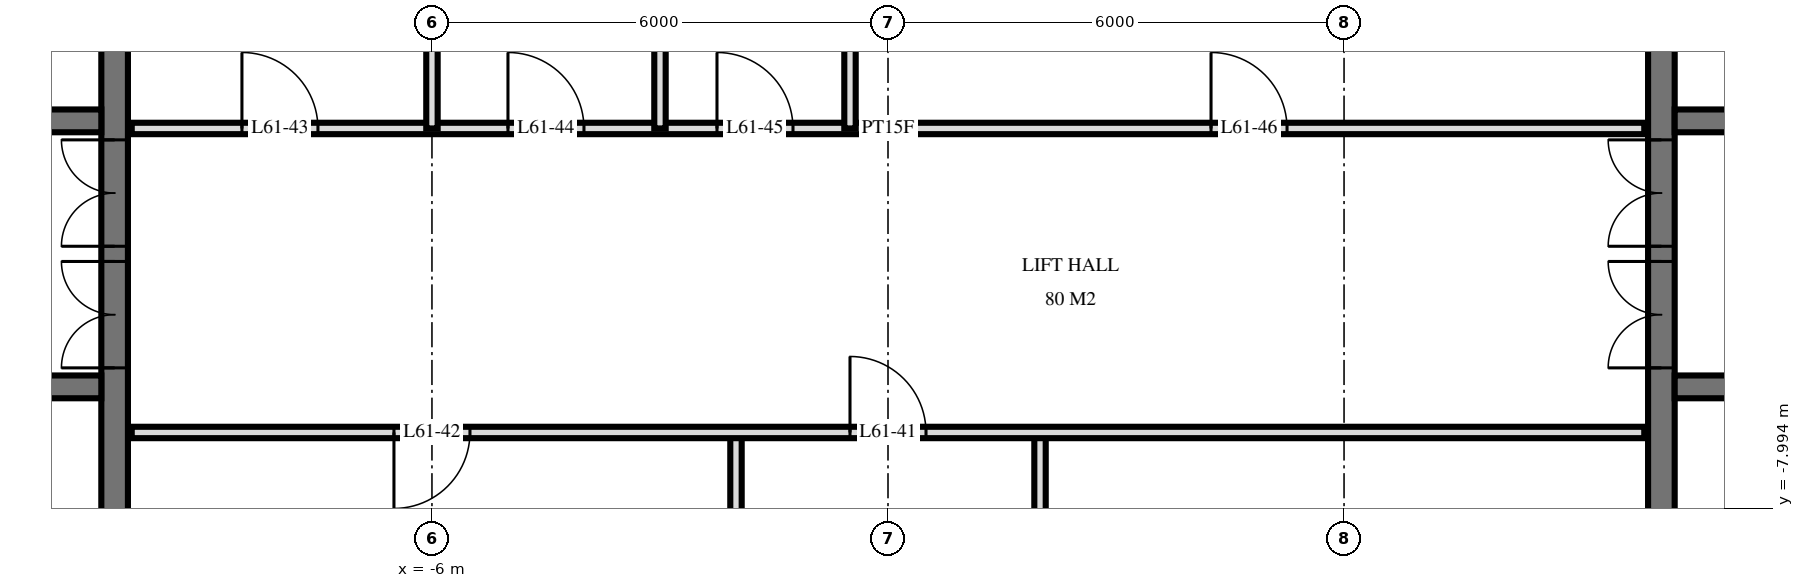
"""IFC4 building model, lengths in metres.
Left out: names, types, materials, properties, quantities, classifications, styles, units other than length and angle.
Written with IfcOpenShell. Run it as: python <this file> out.ifc"""

import sys

from ifc_helpers import new_model, si_unit, direction, frame, frame_2d, origin, place, context, subcontext, project, spatial, rectangle, extrude, element, fill, save


model = new_model("IFC4")
c1 = context("Model", 3, precision=1e-05, world=origin(), true_north=direction((0.0, 1.0)))
c2 = subcontext(c1, "Body", "Model", "MODEL_VIEW")
j1 = project(units=[si_unit("LENGTHUNIT", "METRE"), si_unit("PLANEANGLEUNIT", "RADIAN")], contexts=[c1])
p1 = place(None, origin())
s1 = spatial("IfcSite", under=j1, at=p1, CompositionType="ELEMENT")
p2 = place(p1, origin())
s2 = spatial("IfcBuilding", under=s1, at=p2, CompositionType="ELEMENT")
p3 = place(p2, frame((0.0, 0.0, 232.6)))
s3 = spatial("IfcBuildingStorey", under=s2, at=p3, CompositionType="ELEMENT", Elevation=232.6)
p4 = place(p3, frame((-10.175, -14.55, 0.0), z_axis=(0.0, 0.0, 1.0), x_axis=(0.0, 1.0, 0.0)))
e1 = element("IfcWall", 1, at=p4, inside=s3, PredefinedType="SHEAR", context=c2, shape_type="SweptSolid", body=[
    extrude(rectangle(XDim=14.1, YDim=0.35, at=frame_2d((7.05, 0.0))), origin(), (0.0, 0.0, 1.0), 3.5),
])
p5 = place(p4, frame((8.4, 0.0, 0.0)))
e2 = element("IfcOpeningElement", 2, at=p5, cuts=e1, PredefinedType="OPENING", context=c2, shape_type="SweptSolid", body=[
    extrude(rectangle(XDim=1.4, YDim=2.4, at=frame_2d((0.7, 1.2))), frame((0.0, 0.185, 0.0), z_axis=(0.0, -1.0, 0.0), x_axis=(1.0, 0.0, 0.0)), (0.0, 0.0, 1.0), 0.37),
])
p6 = place(p4, frame((10.0, 0.0, 0.0)))
e3 = element("IfcOpeningElement", 3, at=p6, cuts=e1, PredefinedType="OPENING", context=c2, shape_type="SweptSolid", body=[
    extrude(rectangle(XDim=1.4, YDim=2.4, at=frame_2d((0.7, 1.2))), frame((0.0, 0.185, 0.0), z_axis=(0.0, -1.0, 0.0), x_axis=(1.0, 0.0, 0.0)), (0.0, 0.0, 1.0), 0.37),
])
p7 = place(p4, frame((4.0, 0.0, 0.0)))
e4 = element("IfcOpeningElement", 4, at=p7, cuts=e1, PredefinedType="OPENING", context=c2, shape_type="SweptSolid", body=[
    extrude(rectangle(XDim=1.2, YDim=2.1, at=frame_2d((0.6, 1.05))), frame((0.0, 0.185, 0.0), z_axis=(0.0, -1.0, 0.0), x_axis=(1.0, 0.0, 0.0)), (0.0, 0.0, 1.0), 0.37),
])
p8 = place(p3, frame((-24.05, -2.9, 0.0), z_axis=(0.0, 0.0, 1.0), x_axis=(1.0, 0.0, 0.0)))
e5 = element("IfcWall", 5, at=p8, inside=s3, PredefinedType="SHEAR", context=c2, shape_type="SweptSolid", body=[
    extrude(rectangle(XDim=13.7, YDim=0.3, at=frame_2d((6.85, 0.0))), origin(), (0.0, 0.0, 1.0), 3.5),
])
p9 = place(p8, frame((0.55, 0.0, 0.0)))
e6 = element("IfcOpeningElement", 6, at=p9, cuts=e5, PredefinedType="OPENING", context=c2, shape_type="SweptSolid", body=[
    extrude(rectangle(XDim=1.1, YDim=2.1, at=frame_2d((0.55, 1.05))), frame((0.0, 0.16, 0.0), z_axis=(0.0, -1.0, 0.0), x_axis=(1.0, 0.0, 0.0)), (0.0, 0.0, 1.0), 0.32),
])
p10 = place(p8, frame((5.9, 0.0, 0.0)))
e7 = element("IfcOpeningElement", 7, at=p10, cuts=e5, PredefinedType="OPENING", context=c2, shape_type="SweptSolid", body=[
    extrude(rectangle(XDim=0.9, YDim=2.1, at=frame_2d((0.45, 1.05))), frame((0.0, 0.16, 0.0), z_axis=(0.0, -1.0, 0.0), x_axis=(1.0, 0.0, 0.0)), (0.0, 0.0, 1.0), 0.32),
])
p11 = place(p8, frame((11.85, 0.0, 0.0)))
e8 = element("IfcOpeningElement", 8, at=p11, cuts=e5, PredefinedType="OPENING", context=c2, shape_type="SweptSolid", body=[
    extrude(rectangle(XDim=1.0, YDim=2.1, at=frame_2d((0.5, 1.05))), frame((0.0, 0.16, 0.0), z_axis=(0.0, -1.0, 0.0), x_axis=(1.0, 0.0, 0.0)), (0.0, 0.0, 1.0), 0.32),
])
p12 = place(p8, frame((8.85, 0.0, 0.0)))
e9 = element("IfcOpeningElement", 9, at=p12, cuts=e5, PredefinedType="OPENING", context=c2, shape_type="SweptSolid", body=[
    extrude(rectangle(XDim=1.0, YDim=2.1, at=frame_2d((0.5, 1.05))), frame((0.0, 0.16, 0.0), z_axis=(0.0, -1.0, 0.0), x_axis=(1.0, 0.0, 0.0)), (0.0, 0.0, 1.0), 0.32),
])
p13 = place(p8, frame((3.0, 0.0, 0.0)))
e10 = element("IfcOpeningElement", 10, at=p13, cuts=e5, PredefinedType="OPENING", context=c2, shape_type="SweptSolid", body=[
    extrude(rectangle(XDim=1.0, YDim=2.1, at=frame_2d((0.5, 1.05))), frame((0.0, 0.16, 0.0), z_axis=(0.0, -1.0, 0.0), x_axis=(1.0, 0.0, 0.0)), (0.0, 0.0, 1.0), 0.32),
])
p14 = place(p3, frame((-24.05, -6.4, 0.0), z_axis=(0.0, 0.0, 1.0), x_axis=(1.0, 0.0, 0.0)))
e11 = element("IfcWall", 11, at=p14, inside=s3, PredefinedType="SHEAR", context=c2, shape_type="SweptSolid", body=[
    extrude(rectangle(XDim=13.7, YDim=0.3, at=frame_2d((6.85, 0.0))), origin(), (0.0, 0.0, 1.0), 3.5),
])
p15 = place(p14, frame((0.55, 0.0, 0.0)))
e12 = element("IfcOpeningElement", 12, at=p15, cuts=e11, PredefinedType="OPENING", context=c2, shape_type="SweptSolid", body=[
    extrude(rectangle(XDim=1.1, YDim=2.1, at=frame_2d((0.55, 1.05))), frame((0.0, 0.16, 0.0), z_axis=(0.0, -1.0, 0.0), x_axis=(1.0, 0.0, 0.0)), (0.0, 0.0, 1.0), 0.32),
])
p16 = place(p14, frame((5.8, 0.0, 0.0)))
e13 = element("IfcOpeningElement", 13, at=p16, cuts=e11, PredefinedType="OPENING", context=c2, shape_type="SweptSolid", body=[
    extrude(rectangle(XDim=1.1, YDim=2.1, at=frame_2d((0.55, 1.05))), frame((0.0, 0.16, 0.0), z_axis=(0.0, -1.0, 0.0), x_axis=(1.0, 0.0, 0.0)), (0.0, 0.0, 1.0), 0.32),
])
p17 = place(p3, frame((10.175, -14.55, 0.0), z_axis=(0.0, 0.0, 1.0), x_axis=(0.0, 1.0, 0.0)))
e14 = element("IfcWall", 14, at=p17, inside=s3, PredefinedType="SHEAR", context=c2, shape_type="SweptSolid", body=[
    extrude(rectangle(XDim=14.1, YDim=0.35, at=frame_2d((7.05, 0.0))), origin(), (0.0, 0.0, 1.0), 3.5),
])
p18 = place(p17, frame((8.4, 0.0, 0.0)))
e15 = element("IfcOpeningElement", 15, at=p18, cuts=e14, PredefinedType="OPENING", context=c2, shape_type="SweptSolid", body=[
    extrude(rectangle(XDim=1.4, YDim=2.4, at=frame_2d((0.7, 1.2))), frame((0.0, 0.185, 0.0), z_axis=(0.0, -1.0, 0.0), x_axis=(1.0, 0.0, 0.0)), (0.0, 0.0, 1.0), 0.37),
])
p19 = place(p17, frame((10.0, 0.0, 0.0)))
e16 = element("IfcOpeningElement", 16, at=p19, cuts=e14, PredefinedType="OPENING", context=c2, shape_type="SweptSolid", body=[
    extrude(rectangle(XDim=1.4, YDim=2.4, at=frame_2d((0.7, 1.2))), frame((0.0, 0.185, 0.0), z_axis=(0.0, -1.0, 0.0), x_axis=(1.0, 0.0, 0.0)), (0.0, 0.0, 1.0), 0.37),
])
p20 = place(p17, frame((4.0, 0.0, 0.0)))
e17 = element("IfcOpeningElement", 17, at=p20, cuts=e14, PredefinedType="OPENING", context=c2, shape_type="SweptSolid", body=[
    extrude(rectangle(XDim=1.2, YDim=2.1, at=frame_2d((0.6, 1.05))), frame((0.0, 0.185, 0.0), z_axis=(0.0, -1.0, 0.0), x_axis=(1.0, 0.0, 0.0)), (0.0, 0.0, 1.0), 0.37),
])
p21 = place(p3, frame((10.35, -2.9, 0.0), z_axis=(0.0, 0.0, 1.0), x_axis=(1.0, 0.0, 0.0)))
e18 = element("IfcWall", 18, at=p21, inside=s3, PredefinedType="SHEAR", context=c2, shape_type="SweptSolid", body=[
    extrude(rectangle(XDim=13.7, YDim=0.3, at=frame_2d((6.85, 0.0))), origin(), (0.0, 0.0, 1.0), 3.5),
])
p22 = place(p21, frame((12.05, 0.0, 0.0)))
e19 = element("IfcOpeningElement", 19, at=p22, cuts=e18, PredefinedType="OPENING", context=c2, shape_type="SweptSolid", body=[
    extrude(rectangle(XDim=1.1, YDim=2.1, at=frame_2d((0.55, 1.05))), frame((0.0, 0.16, 0.0), z_axis=(0.0, -1.0, 0.0), x_axis=(1.0, 0.0, 0.0)), (0.0, 0.0, 1.0), 0.32),
])
p23 = place(p21, frame((6.9, 0.0, 0.0)))
e20 = element("IfcOpeningElement", 20, at=p23, cuts=e18, PredefinedType="OPENING", context=c2, shape_type="SweptSolid", body=[
    extrude(rectangle(XDim=0.9, YDim=2.1, at=frame_2d((0.45, 1.05))), frame((0.0, 0.16, 0.0), z_axis=(0.0, -1.0, 0.0), x_axis=(1.0, 0.0, 0.0)), (0.0, 0.0, 1.0), 0.32),
])
p24 = place(p21, frame((0.85, 0.0, 0.0)))
e21 = element("IfcOpeningElement", 21, at=p24, cuts=e18, PredefinedType="OPENING", context=c2, shape_type="SweptSolid", body=[
    extrude(rectangle(XDim=1.0, YDim=2.1, at=frame_2d((0.5, 1.05))), frame((0.0, 0.16, 0.0), z_axis=(0.0, -1.0, 0.0), x_axis=(1.0, 0.0, 0.0)), (0.0, 0.0, 1.0), 0.32),
])
p25 = place(p21, frame((3.85, 0.0, 0.0)))
e22 = element("IfcOpeningElement", 22, at=p25, cuts=e18, PredefinedType="OPENING", context=c2, shape_type="SweptSolid", body=[
    extrude(rectangle(XDim=1.0, YDim=2.1, at=frame_2d((0.5, 1.05))), frame((0.0, 0.16, 0.0), z_axis=(0.0, -1.0, 0.0), x_axis=(1.0, 0.0, 0.0)), (0.0, 0.0, 1.0), 0.32),
])
p26 = place(p21, frame((9.7, 0.0, 0.0)))
e23 = element("IfcOpeningElement", 23, at=p26, cuts=e18, PredefinedType="OPENING", context=c2, shape_type="SweptSolid", body=[
    extrude(rectangle(XDim=1.0, YDim=2.1, at=frame_2d((0.5, 1.05))), frame((0.0, 0.16, 0.0), z_axis=(0.0, -1.0, 0.0), x_axis=(1.0, 0.0, 0.0)), (0.0, 0.0, 1.0), 0.32),
])
p27 = place(p3, frame((10.35, -6.4, 0.0), z_axis=(0.0, 0.0, 1.0), x_axis=(1.0, 0.0, 0.0)))
e24 = element("IfcWall", 24, at=p27, inside=s3, PredefinedType="SHEAR", context=c2, shape_type="SweptSolid", body=[
    extrude(rectangle(XDim=13.7, YDim=0.3, at=frame_2d((6.85, 0.0))), origin(), (0.0, 0.0, 1.0), 3.5),
])
p28 = place(p27, frame((12.05, 0.0, 0.0)))
e25 = element("IfcOpeningElement", 25, at=p28, cuts=e24, PredefinedType="OPENING", context=c2, shape_type="SweptSolid", body=[
    extrude(rectangle(XDim=1.1, YDim=2.1, at=frame_2d((0.55, 1.05))), frame((0.0, 0.16, 0.0), z_axis=(0.0, -1.0, 0.0), x_axis=(1.0, 0.0, 0.0)), (0.0, 0.0, 1.0), 0.32),
])
p29 = place(p27, frame((6.8, 0.0, 0.0)))
e26 = element("IfcOpeningElement", 26, at=p29, cuts=e24, PredefinedType="OPENING", context=c2, shape_type="SweptSolid", body=[
    extrude(rectangle(XDim=1.1, YDim=2.1, at=frame_2d((0.55, 1.05))), frame((0.0, 0.16, 0.0), z_axis=(0.0, -1.0, 0.0), x_axis=(1.0, 0.0, 0.0)), (0.0, 0.0, 1.0), 0.32),
])
p30 = place(p3, frame((2.0, -11.0, 0.0), z_axis=(0.0, 0.0, 1.0), x_axis=(0.0, 1.0, 0.0)))
e27 = element("IfcWall", 27, at=p30, inside=s3, PredefinedType="PARTITIONING", context=c2, shape_type="SweptSolid", body=[
    extrude(rectangle(XDim=4.0, YDim=0.15, at=frame_2d((2.0, 0.0))), origin(), (0.0, 0.0, 1.0), 3.22),
])
p31 = place(p3, frame((-0.5, -3.0, 0.0), z_axis=(0.0, 0.0, 1.0), x_axis=(0.0, 1.0, 0.0)))
e28 = element("IfcWall", 28, at=p31, inside=s3, PredefinedType="PLUMBINGWALL", context=c2, shape_type="SweptSolid", body=[
    extrude(rectangle(XDim=4.02, YDim=0.15, at=frame_2d((2.01, 0.0))), origin(), (0.0, 0.0, 1.0), 3.22),
])
p32 = place(p3, frame((-2.0, -11.0, 0.0), z_axis=(0.0, 0.0, 1.0), x_axis=(0.0, 1.0, 0.0)))
e29 = element("IfcWall", 29, at=p32, inside=s3, PredefinedType="PARTITIONING", context=c2, shape_type="SweptSolid", body=[
    extrude(rectangle(XDim=4.0, YDim=0.15, at=frame_2d((2.0, 0.0))), origin(), (0.0, 0.0, 1.0), 3.22),
])
for number, where, z_axis, x_axis in (
    (30, (-3.0, -3.0, 0.0), (0.0, 0.0, 1.0), (0.0, 1.0, 0.0)),
    (31, (-6.0, -3.0, 0.0), (0.0, 0.0, 1.0), (0.0, 1.0, 0.0)),
):
    element("IfcWall", number, at=place(p3, frame(where, z_axis=z_axis, x_axis=x_axis)), inside=s3, PredefinedType="PLUMBINGWALL", context=c2, shape_type="SweptSolid", body=[
        extrude(rectangle(XDim=4.02, YDim=0.15, at=frame_2d((2.01, 0.0))), origin(), (0.0, 0.0, 1.0), 3.22),
    ])
p33 = place(p3, frame((-9.95, -7.0, 0.0), z_axis=(0.0, 0.0, 1.0), x_axis=(1.0, 0.0, 0.0)))
e32 = element("IfcWall", 32, at=p33, inside=s3, PredefinedType="PARTITIONING", context=c2, shape_type="SweptSolid", body=[
    extrude(rectangle(XDim=19.9, YDim=0.15, at=frame_2d((9.95, 0.0))), origin(), (0.0, 0.0, 1.0), 3.22),
])
p34 = place(p33, frame((9.45, 0.0, 0.0)))
e33 = element("IfcOpeningElement", 33, at=p34, cuts=e32, PredefinedType="OPENING", context=c2, shape_type="SweptSolid", body=[
    extrude(rectangle(XDim=1.0, YDim=2.1, at=frame_2d((0.5, 1.05))), frame((0.0, 0.085, 0.0), z_axis=(0.0, -1.0, 0.0), x_axis=(1.0, 0.0, 0.0)), (0.0, 0.0, 1.0), 0.17),
])
p35 = place(p33, frame((3.45, 0.0, 0.0)))
e34 = element("IfcOpeningElement", 34, at=p35, cuts=e32, PredefinedType="OPENING", context=c2, shape_type="SweptSolid", body=[
    extrude(rectangle(XDim=1.0, YDim=2.1, at=frame_2d((0.5, 1.05))), frame((0.0, 0.085, 0.0), z_axis=(0.0, -1.0, 0.0), x_axis=(1.0, 0.0, 0.0)), (0.0, 0.0, 1.0), 0.17),
])
p36 = place(p3, frame((-9.95, -3.0, 0.0), z_axis=(0.0, 0.0, 1.0), x_axis=(1.0, 0.0, 0.0)))
e35 = element("IfcWall", 35, at=p36, inside=s3, PredefinedType="PARTITIONING", context=c2, shape_type="SweptSolid", body=[
    extrude(rectangle(XDim=19.9, YDim=0.15, at=frame_2d((9.95, 0.0))), origin(), (0.0, 0.0, 1.0), 3.22),
])
p37 = place(p36, frame((1.45, 0.0, 0.0)))
e36 = element("IfcOpeningElement", 36, at=p37, cuts=e35, PredefinedType="OPENING", context=c2, shape_type="SweptSolid", body=[
    extrude(rectangle(XDim=1.0, YDim=2.1, at=frame_2d((0.5, 1.05))), frame((0.0, 0.085, 0.0), z_axis=(0.0, -1.0, 0.0), x_axis=(1.0, 0.0, 0.0)), (0.0, 0.0, 1.0), 0.17),
])
p38 = place(p36, frame((4.95, 0.0, 0.0)))
e37 = element("IfcOpeningElement", 37, at=p38, cuts=e35, PredefinedType="OPENING", context=c2, shape_type="SweptSolid", body=[
    extrude(rectangle(XDim=1.0, YDim=2.1, at=frame_2d((0.5, 1.05))), frame((0.0, 0.085, 0.0), z_axis=(0.0, -1.0, 0.0), x_axis=(1.0, 0.0, 0.0)), (0.0, 0.0, 1.0), 0.17),
])
p39 = place(p36, frame((7.7, 0.0, 0.0)))
e38 = element("IfcOpeningElement", 38, at=p39, cuts=e35, PredefinedType="OPENING", context=c2, shape_type="SweptSolid", body=[
    extrude(rectangle(XDim=1.0, YDim=2.1, at=frame_2d((0.5, 1.05))), frame((0.0, 0.085, 0.0), z_axis=(0.0, -1.0, 0.0), x_axis=(1.0, 0.0, 0.0)), (0.0, 0.0, 1.0), 0.17),
])
p40 = place(p36, frame((14.2, 0.0, 0.0)))
e39 = element("IfcOpeningElement", 39, at=p40, cuts=e35, PredefinedType="OPENING", context=c2, shape_type="SweptSolid", body=[
    extrude(rectangle(XDim=1.0, YDim=2.1, at=frame_2d((0.5, 1.05))), frame((0.0, 0.085, 0.0), z_axis=(0.0, -1.0, 0.0), x_axis=(1.0, 0.0, 0.0)), (0.0, 0.0, 1.0), 0.17),
])
p41 = place(p5, origin())
e40 = element("IfcDoor", 40, at=p41, inside=s3, OperationType="DOUBLE_DOOR_SINGLE_SWING", PredefinedType="DOOR", context=c2, shape_type="SweptSolid", body=[
    extrude(rectangle(XDim=1.4, YDim=2.4, at=frame_2d((0.7, 1.2))), frame((0.0, 0.025, 0.0), z_axis=(0.0, -1.0, 0.0), x_axis=(1.0, 0.0, 0.0)), (0.0, 0.0, 1.0), 0.05),
])
fill(e2, e40)
p42 = place(p6, origin())
e41 = element("IfcDoor", 41, at=p42, inside=s3, OperationType="DOUBLE_DOOR_SINGLE_SWING", PredefinedType="DOOR", context=c2, shape_type="SweptSolid", body=[
    extrude(rectangle(XDim=1.4, YDim=2.4, at=frame_2d((0.7, 1.2))), frame((0.0, 0.025, 0.0), z_axis=(0.0, -1.0, 0.0), x_axis=(1.0, 0.0, 0.0)), (0.0, 0.0, 1.0), 0.05),
])
fill(e3, e41)
p43 = place(p18, origin())
e42 = element("IfcDoor", 42, at=p43, inside=s3, OperationType="DOUBLE_DOOR_SINGLE_SWING", PredefinedType="DOOR", context=c2, shape_type="SweptSolid", body=[
    extrude(rectangle(XDim=1.4, YDim=2.4, at=frame_2d((0.7, 1.2))), frame((0.0, 0.025, 0.0), z_axis=(0.0, -1.0, 0.0), x_axis=(1.0, 0.0, 0.0)), (0.0, 0.0, 1.0), 0.05),
])
fill(e15, e42)
p44 = place(p19, origin())
e43 = element("IfcDoor", 43, at=p44, inside=s3, OperationType="DOUBLE_DOOR_SINGLE_SWING", PredefinedType="DOOR", context=c2, shape_type="SweptSolid", body=[
    extrude(rectangle(XDim=1.4, YDim=2.4, at=frame_2d((0.7, 1.2))), frame((0.0, 0.025, 0.0), z_axis=(0.0, -1.0, 0.0), x_axis=(1.0, 0.0, 0.0)), (0.0, 0.0, 1.0), 0.05),
])
fill(e16, e43)
p45 = place(p34, origin())
e44 = element("IfcDoor", 44, at=p45, inside=s3, OperationType="SINGLE_SWING_RIGHT", PredefinedType="DOOR", context=c2, shape_type="SweptSolid", body=[
    extrude(rectangle(XDim=1.0, YDim=2.1, at=frame_2d((0.5, 1.05))), frame((0.0, 0.025, 0.0), z_axis=(0.0, -1.0, 0.0), x_axis=(1.0, 0.0, 0.0)), (0.0, 0.0, 1.0), 0.05),
])
fill(e33, e44)
p46 = place(p35, frame((0.5, 0.0, 0.0), z_axis=(0.0, 0.0, 1.0), x_axis=(-1.0, 0.0, 0.0)))
e45 = element("IfcDoor", 45, at=p46, inside=s3, OperationType="SINGLE_SWING_LEFT", PredefinedType="DOOR", context=c2, shape_type="SweptSolid", body=[
    extrude(rectangle(XDim=1.0, YDim=2.1, at=frame_2d((0.0, 1.05))), frame((0.0, -0.025, 0.0), z_axis=(0.0, 1.0, 0.0), x_axis=(-1.0, 0.0, 0.0)), (0.0, 0.0, 1.0), 0.05),
])
fill(e34, e45)
p47 = place(p37, origin())
e46 = element("IfcDoor", 46, at=p47, inside=s3, OperationType="SINGLE_SWING_RIGHT", PredefinedType="DOOR", context=c2, shape_type="SweptSolid", body=[
    extrude(rectangle(XDim=1.0, YDim=2.1, at=frame_2d((0.5, 1.05))), frame((0.0, 0.025, 0.0), z_axis=(0.0, -1.0, 0.0), x_axis=(1.0, 0.0, 0.0)), (0.0, 0.0, 1.0), 0.05),
])
fill(e36, e46)
p48 = place(p38, origin())
e47 = element("IfcDoor", 47, at=p48, inside=s3, OperationType="SINGLE_SWING_RIGHT", PredefinedType="DOOR", context=c2, shape_type="SweptSolid", body=[
    extrude(rectangle(XDim=1.0, YDim=2.1, at=frame_2d((0.5, 1.05))), frame((0.0, 0.025, 0.0), z_axis=(0.0, -1.0, 0.0), x_axis=(1.0, 0.0, 0.0)), (0.0, 0.0, 1.0), 0.05),
])
fill(e37, e47)
p49 = place(p39, origin())
e48 = element("IfcDoor", 48, at=p49, inside=s3, OperationType="SINGLE_SWING_RIGHT", PredefinedType="DOOR", context=c2, shape_type="SweptSolid", body=[
    extrude(rectangle(XDim=1.0, YDim=2.1, at=frame_2d((0.5, 1.05))), frame((0.0, 0.025, 0.0), z_axis=(0.0, -1.0, 0.0), x_axis=(1.0, 0.0, 0.0)), (0.0, 0.0, 1.0), 0.05),
])
fill(e38, e48)
p50 = place(p40, origin())
e49 = element("IfcDoor", 49, at=p50, inside=s3, OperationType="SINGLE_SWING_RIGHT", PredefinedType="DOOR", context=c2, shape_type="SweptSolid", body=[
    extrude(rectangle(XDim=1.0, YDim=2.1, at=frame_2d((0.5, 1.05))), frame((0.0, 0.025, 0.0), z_axis=(0.0, -1.0, 0.0), x_axis=(1.0, 0.0, 0.0)), (0.0, 0.0, 1.0), 0.05),
])
fill(e39, e49)
save(model, sys.argv[1])
